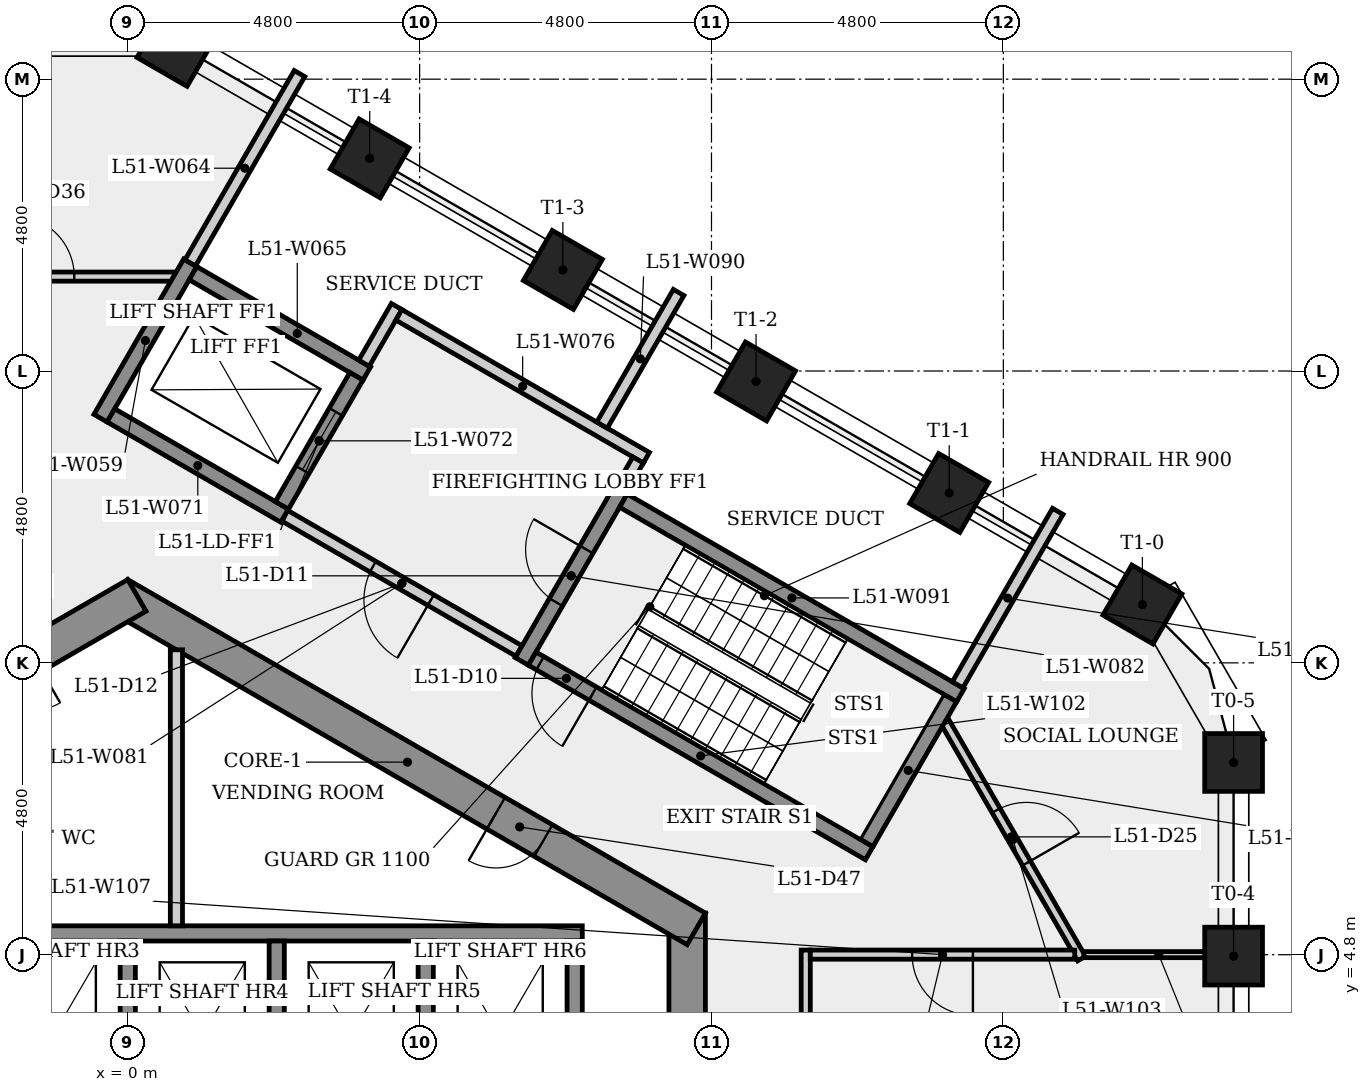
"""IFC4 building model, lengths in metres.
Left out: names, types, materials, properties, quantities, classifications, styles, units other than length and angle.
Written with IfcOpenShell. Run it as: python <this file> out.ifc"""

import sys

from ifc_helpers import new_model, si_unit, direction, frame, frame_2d, origin, origin_2d, place, context, subcontext, project, spatial, rectangle, extrude, element, fill, save


model = new_model("IFC4")
c1 = context("Model", 3, precision=1e-05, world=origin(), true_north=direction((0.0, 1.0)))
c2 = subcontext(c1, "Body", "Model", "MODEL_VIEW")
j1 = project(units=[si_unit("LENGTHUNIT", "METRE"), si_unit("PLANEANGLEUNIT", "RADIAN")], contexts=[c1])
p1 = place(None, origin())
s1 = spatial("IfcSite", under=j1, at=p1, CompositionType="ELEMENT")
p2 = place(p1, origin())
s2 = spatial("IfcBuilding", under=s1, at=p2, CompositionType="ELEMENT")
p3 = place(p2, frame((0.0, 0.0, 190.7)))
s3 = spatial("IfcBuildingStorey", under=s2, at=p3, CompositionType="ELEMENT", Elevation=190.7)
p4 = place(p3, frame((9.2, -5.485, 0.0), z_axis=(0.0, 0.0, 1.0), x_axis=(0.0, 1.0, 0.0)))
e1 = element("IfcWall", 1, at=p4, inside=s3, PredefinedType="SHEAR", context=c2, shape_type="SweptSolid", body=[
    extrude(rectangle(XDim=10.97, YDim=0.6, at=frame_2d((5.485, 0.0))), origin(), (0.0, 0.0, 1.0), 4.0),
])
p5 = place(p4, frame((4.685, 0.0, 0.0)))
e2 = element("IfcOpeningElement", 2, at=p5, cuts=e1, PredefinedType="OPENING", context=c2, shape_type="SweptSolid", body=[
    extrude(rectangle(XDim=1.6, YDim=2.1, at=frame_2d((0.8, 1.05))), frame((0.0, 0.31, 0.0), z_axis=(0.0, -1.0, 0.0), x_axis=(1.0, 0.0, 0.0)), (0.0, 0.0, 1.0), 0.62),
])
p6 = place(p3, frame((9.35, 5.225, 0.0), z_axis=(0.0, 0.0, 1.0), x_axis=(-0.866023993627, 0.500002442456, 0.0)))
e3 = element("IfcWall", 3, at=p6, inside=s3, PredefinedType="SHEAR", context=c2, shape_type="SweptSolid", body=[
    extrude(rectangle(XDim=10.97, YDim=0.6, at=frame_2d((5.485, 0.0))), origin(), (0.0, 0.0, 1.0), 4.0),
])
p7 = place(p6, frame((2.904, 0.0, 0.0)))
e4 = element("IfcOpeningElement", 4, at=p7, cuts=e3, PredefinedType="OPENING", context=c2, shape_type="SweptSolid", body=[
    extrude(rectangle(XDim=0.9, YDim=2.1, at=frame_2d((0.45, 1.05))), frame((0.0, 0.31, 0.0), z_axis=(0.0, -1.0, 0.0), x_axis=(1.0, 0.0, 0.0)), (0.0, 0.0, 1.0), 0.62),
])
p8 = place(p3, frame((0.15, 10.71, 0.0), z_axis=(0.0, 0.0, 1.0), x_axis=(-0.866023993627, -0.500002442456, 0.0)))
e5 = element("IfcWall", 5, at=p8, inside=s3, PredefinedType="SHEAR", context=c2, shape_type="SweptSolid", body=[
    extrude(rectangle(XDim=10.97, YDim=0.6, at=frame_2d((5.485, 0.0))), origin(), (0.0, 0.0, 1.0), 4.0),
])
p9 = place(p8, frame((9.182, 0.0, 0.0)))
e6 = element("IfcOpeningElement", 6, at=p9, cuts=e5, PredefinedType="OPENING", context=c2, shape_type="SweptSolid", body=[
    extrude(rectangle(XDim=0.9, YDim=2.1, at=frame_2d((0.45, 1.05))), frame((0.0, 0.31, 0.0), z_axis=(0.0, -1.0, 0.0), x_axis=(1.0, 0.0, 0.0)), (0.0, 0.0, 1.0), 0.62),
])
p10 = place(p8, frame((1.975, 0.0, 0.0)))
e7 = element("IfcOpeningElement", 7, at=p10, cuts=e5, PredefinedType="OPENING", context=c2, shape_type="SweptSolid", body=[
    extrude(rectangle(XDim=0.9, YDim=2.1, at=frame_2d((0.45, 1.05))), frame((0.0, 0.31, 0.0), z_axis=(0.0, -1.0, 0.0), x_axis=(1.0, 0.0, 0.0)), (0.0, 0.0, 1.0), 0.62),
])
for number, where, z_axis, x_axis in (
    (8, (18.187, 4.777, 0.0), (0.0, 0.0, 1.0), (1.0, 0.0, 0.0)),
    (9, (18.187, 7.962, 0.0), (0.0, 0.0, 1.0), (1.0, 0.0, 0.0)),
    (10, (16.687, 10.56, 0.0), (0.0, 0.0, 1.0), (0.5, 0.866, 0.0)),
    (11, (13.51, 12.394, 0.0), (0.0, 0.0, 1.0), (0.5, 0.866, 0.0)),
    (12, (10.333, 14.228, 0.0), (0.0, 0.0, 1.0), (0.5, 0.866, 0.0)),
    (13, (7.156, 16.062, 0.0), (0.0, 0.0, 1.0), (0.5, 0.866, 0.0)),
    (14, (3.979, 17.897, 0.0), (0.0, 0.0, 1.0), (0.5, 0.866, 0.0)),
    (15, (0.802, 19.731, 0.0), (0.0, 0.0, 1.0), (0.5, 0.866, 0.0)),
):
    element("IfcColumn", number, at=place(p3, frame(where, z_axis=z_axis, x_axis=x_axis)), inside=s3, PredefinedType="COLUMN", context=c2, shape_type="SweptSolid", body=[
        extrude(rectangle(XDim=0.95, YDim=0.95, at=origin_2d()), origin(), (0.0, 0.0, 1.0), 4.0),
    ])
p11 = place(p3, frame((-7.225, 5.15, 0.0), z_axis=(0.0, 0.0, 1.0), x_axis=(1.0, 0.0, 0.0)))
e16 = element("IfcWall", 16, at=p11, inside=s3, PredefinedType="SHEAR", context=c2, shape_type="SweptSolid", body=[
    extrude(rectangle(XDim=14.7, YDim=0.25, at=frame_2d((7.35, 0.0))), origin(), (0.0, 0.0, 1.0), 3.6),
])
p12 = place(p3, frame((-4.989, 18.524, 0.0), z_axis=(0.0, 0.0, 1.0), x_axis=(0.866025916125, 0.499999112599, 0.0)))
e17 = element("IfcWall", 17, at=p12, inside=s3, PredefinedType="PARTITIONING", context=c2, shape_type="SweptSolid", body=[
    extrude(rectangle(XDim=16.754, YDim=0.1, at=frame_2d((8.377, 0.0))), origin(), (0.0, 0.0, 1.0), 3.6),
])
p13 = place(p3, frame((-3.741, 15.953, 0.0), z_axis=(0.0, 0.0, 1.0), x_axis=(1.0, 0.0, 0.0)))
e18 = element("IfcWall", 18, at=p13, inside=s3, PredefinedType="PARTITIONING", context=c2, shape_type="SweptSolid", body=[
    extrude(rectangle(XDim=4.513, YDim=0.15, at=frame_2d((2.256, 0.0))), origin(), (0.0, 0.0, 1.0), 3.6),
])
p14 = place(p13, frame((1.861, 0.0, 0.0)))
e19 = element("IfcOpeningElement", 19, at=p14, cuts=e18, PredefinedType="OPENING", context=c2, shape_type="SweptSolid", body=[
    extrude(rectangle(XDim=1.0, YDim=2.1, at=frame_2d((0.5, 1.05))), frame((0.0, 0.085, 0.0), z_axis=(0.0, -1.0, 0.0), x_axis=(1.0, 0.0, 0.0)), (0.0, 0.0, 1.0), 0.17),
])
p15 = place(p3, frame((-0.448, 13.624, 0.0), z_axis=(0.0, 0.0, 1.0), x_axis=(0.500037662692, 0.866003658127, 0.0)))
e20 = element("IfcWall", 20, at=p15, inside=s3, PredefinedType="SHEAR", context=c2, shape_type="SweptSolid", body=[
    extrude(rectangle(XDim=2.95, YDim=0.25, at=frame_2d((1.475, 0.0))), origin(), (0.0, 0.0, 1.0), 3.6),
])
p16 = place(p3, frame((0.0, 5.025, 0.0), z_axis=(0.0, 0.0, 1.0), x_axis=(0.0, -1.0, 0.0)))
e21 = element("IfcWall", 21, at=p16, inside=s3, PredefinedType="SHEAR", context=c2, shape_type="SweptSolid", body=[
    extrude(rectangle(XDim=3.1, YDim=0.25, at=frame_2d((1.55, 0.0))), origin(), (0.0, 0.0, 1.0), 4.0),
])
p17 = place(p3, frame((0.8, 9.815, 0.0), z_axis=(0.0, 0.0, 1.0), x_axis=(0.0, -1.0, 0.0)))
e22 = element("IfcWall", 22, at=p17, inside=s3, PredefinedType="PARTITIONING", context=c2, shape_type="SweptSolid", body=[
    extrude(rectangle(XDim=4.54, YDim=0.2, at=frame_2d((2.27, 0.0))), origin(), (0.0, 0.0, 1.0), 3.6),
])
p18 = place(p3, frame((1.027, 16.179, 0.0), z_axis=(0.0, 0.0, 1.0), x_axis=(0.499988999718, 0.866031754707, 0.0)))
e23 = element("IfcWall", 23, at=p18, inside=s3, PredefinedType="PLUMBINGWALL", context=c2, shape_type="SweptSolid", body=[
    extrude(rectangle(XDim=3.594, YDim=0.2, at=frame_2d((1.797, 0.0))), origin(), (0.0, 0.0, 1.0), 3.6),
])
p19 = place(p3, frame((1.073, 16.008, 0.0), z_axis=(0.0, 0.0, 1.0), x_axis=(0.866040211805, -0.499974350878, 0.0)))
e24 = element("IfcWall", 24, at=p19, inside=s3, PredefinedType="SHEAR", context=c2, shape_type="SweptSolid", body=[
    extrude(rectangle(XDim=3.3, YDim=0.25, at=frame_2d((1.65, 0.0))), origin(), (0.0, 0.0, 1.0), 3.6),
])
p20 = place(p3, frame((2.45, 5.025, 0.0), z_axis=(0.0, 0.0, 1.0), x_axis=(0.0, -1.0, 0.0)))
e25 = element("IfcWall", 25, at=p20, inside=s3, PredefinedType="SHEAR", context=c2, shape_type="SweptSolid", body=[
    extrude(rectangle(XDim=3.1, YDim=0.25, at=frame_2d((1.55, 0.0))), origin(), (0.0, 0.0, 1.0), 4.0),
])
p21 = place(p3, frame((2.581, 12.02, 0.0), z_axis=(0.0, 0.0, 1.0), x_axis=(-0.866040211805, 0.499974350878, 0.0)))
e26 = element("IfcWall", 26, at=p21, inside=s3, PredefinedType="SHEAR", context=c2, shape_type="SweptSolid", body=[
    extrude(rectangle(XDim=3.3, YDim=0.25, at=frame_2d((1.65, 0.0))), origin(), (0.0, 0.0, 1.0), 3.6),
])
p22 = place(p3, frame((2.535, 12.191, 0.0), z_axis=(0.0, 0.0, 1.0), x_axis=(0.500061746146, 0.865989751695, 0.0)))
e27 = element("IfcWall", 27, at=p22, inside=s3, PredefinedType="SHEAR", context=c2, shape_type="SweptSolid", body=[
    extrude(rectangle(XDim=2.45, YDim=0.25, at=frame_2d((1.225, 0.0))), origin(), (0.0, 0.0, 1.0), 4.0),
])
p23 = place(p22, frame((0.675, 0.0, 0.0)))
e28 = element("IfcOpeningElement", 28, at=p23, cuts=e27, PredefinedType="OPENING", context=c2, shape_type="SweptSolid", body=[
    extrude(rectangle(XDim=1.1, YDim=2.1, at=frame_2d((0.55, 1.05))), frame((0.0, 0.135, 0.0), z_axis=(0.0, -1.0, 0.0), x_axis=(1.0, 0.0, 0.0)), (0.0, 0.0, 1.0), 0.27),
])
p24 = place(p3, frame((3.885, 14.529, 0.0), z_axis=(0.0, 0.0, 1.0), x_axis=(0.499997628298, 0.866026773083, 0.0)))
e29 = element("IfcWall", 29, at=p24, inside=s3, PredefinedType="PLUMBINGWALL", context=c2, shape_type="SweptSolid", body=[
    extrude(rectangle(XDim=1.075, YDim=0.2, at=frame_2d((0.538, 0.0))), origin(), (0.0, 0.0, 1.0), 3.6),
])
p25 = place(p3, frame((4.459, 15.323, 0.0), z_axis=(0.0, 0.0, 1.0), x_axis=(0.866016039709, -0.500016218704, 0.0)))
e30 = element("IfcWall", 30, at=p25, inside=s3, PredefinedType="PLUMBINGWALL", context=c2, shape_type="SweptSolid", body=[
    extrude(rectangle(XDim=4.7, YDim=0.2, at=frame_2d((2.35, 0.0))), origin(), (0.0, 0.0, 1.0), 3.6),
])
p26 = place(p3, frame((4.9, 5.025, 0.0), z_axis=(0.0, 0.0, 1.0), x_axis=(0.0, -1.0, 0.0)))
e31 = element("IfcWall", 31, at=p26, inside=s3, PredefinedType="SHEAR", context=c2, shape_type="SweptSolid", body=[
    extrude(rectangle(XDim=3.1, YDim=0.25, at=frame_2d((1.55, 0.0))), origin(), (0.0, 0.0, 1.0), 4.0),
])
p27 = place(p3, frame((6.435, 9.795, 0.0), z_axis=(0.0, 0.0, 1.0), x_axis=(-0.866012907634, 0.500021643343, 0.0)))
e32 = element("IfcWall", 32, at=p27, inside=s3, PredefinedType="PARTITIONING", context=c2, shape_type="SweptSolid", body=[
    extrude(rectangle(XDim=4.45, YDim=0.2, at=frame_2d((2.225, 0.0))), origin(), (0.0, 0.0, 1.0), 3.6),
])
p28 = place(p27, frame((1.675, 0.0, 0.0)))
e33 = element("IfcOpeningElement", 33, at=p28, cuts=e32, PredefinedType="OPENING", context=c2, shape_type="SweptSolid", body=[
    extrude(rectangle(XDim=1.1, YDim=2.1, at=frame_2d((0.55, 1.05))), frame((0.0, 0.11, 0.0), z_axis=(0.0, -1.0, 0.0), x_axis=(1.0, 0.0, 0.0)), (0.0, 0.0, 1.0), 0.22),
])
p29 = place(p3, frame((6.48, 9.624, 0.0), z_axis=(0.0, 0.0, 1.0), x_axis=(0.500017246033, 0.866015446554, 0.0)))
e34 = element("IfcWall", 34, at=p29, inside=s3, PredefinedType="SHEAR", context=c2, shape_type="SweptSolid", body=[
    extrude(rectangle(XDim=3.25, YDim=0.25, at=frame_2d((1.625, 0.0))), origin(), (0.0, 0.0, 1.0), 3.6),
])
p30 = place(p29, frame((1.125, 0.0, 0.0)))
e35 = element("IfcOpeningElement", 35, at=p30, cuts=e34, PredefinedType="OPENING", context=c2, shape_type="SweptSolid", body=[
    extrude(rectangle(XDim=1.0, YDim=2.1, at=frame_2d((0.5, 1.05))), frame((0.0, 0.135, 0.0), z_axis=(0.0, -1.0, 0.0), x_axis=(1.0, 0.0, 0.0)), (0.0, 0.0, 1.0), 0.27),
])
p31 = place(p3, frame((7.35, 5.025, 0.0), z_axis=(0.0, 0.0, 1.0), x_axis=(0.0, -1.0, 0.0)))
e36 = element("IfcWall", 36, at=p31, inside=s3, PredefinedType="SHEAR", context=c2, shape_type="SweptSolid", body=[
    extrude(rectangle(XDim=3.1, YDim=0.25, at=frame_2d((1.55, 0.0))), origin(), (0.0, 0.0, 1.0), 4.0),
])
p32 = place(p3, frame((7.8, 13.51, 0.0), z_axis=(0.0, 0.0, 1.0), x_axis=(0.499985316883, 0.86603388092, 0.0)))
e37 = element("IfcWall", 37, at=p32, inside=s3, PredefinedType="PLUMBINGWALL", context=c2, shape_type="SweptSolid", body=[
    extrude(rectangle(XDim=2.519, YDim=0.2, at=frame_2d((1.26, 0.0))), origin(), (0.0, 0.0, 1.0), 3.6),
])
p33 = place(p3, frame((8.151, 12.268, 0.0), z_axis=(0.0, 0.0, 1.0), x_axis=(0.866025499775, -0.499999833739, 0.0)))
e38 = element("IfcWall", 38, at=p33, inside=s3, PredefinedType="SHEAR", context=c2, shape_type="SweptSolid", body=[
    extrude(rectangle(XDim=6.4, YDim=0.25, at=frame_2d((3.2, 0.0))), origin(), (0.0, 0.0, 1.0), 3.6),
])
p34 = place(p3, frame((8.393, 12.937, 0.0), z_axis=(0.0, 0.0, 1.0), x_axis=(-0.500065409566, -0.86598763626, 0.0)))
e39 = element("IfcWall", 39, at=p34, inside=s3, PredefinedType="PLUMBINGWALL", context=c2, shape_type="SweptSolid", body=[
    extrude(rectangle(XDim=0.575, YDim=0.2, at=frame_2d((0.288, 0.0))), origin(), (0.0, 0.0, 1.0), 3.6),
])
p35 = place(p3, frame((11.15, -4.726, 0.0), z_axis=(0.0, 0.0, 1.0), x_axis=(0.0, 1.0, 0.0)))
e40 = element("IfcWall", 40, at=p35, inside=s3, PredefinedType="PARTITIONING", context=c2, shape_type="SweptSolid", body=[
    extrude(rectangle(XDim=9.603, YDim=0.15, at=frame_2d((4.801, 0.0))), origin(), (0.0, 0.0, 1.0), 3.6),
])
p36 = place(p35, frame((4.226, 0.0, 0.0)))
e41 = element("IfcOpeningElement", 41, at=p36, cuts=e40, PredefinedType="OPENING", context=c2, shape_type="SweptSolid", body=[
    extrude(rectangle(XDim=1.0, YDim=2.1, at=frame_2d((0.5, 1.05))), frame((0.0, 0.085, 0.0), z_axis=(0.0, -1.0, 0.0), x_axis=(1.0, 0.0, 0.0)), (0.0, 0.0, 1.0), 0.17),
])
p37 = place(p3, frame((12.194, 6.47, 0.0), z_axis=(0.0, 0.0, 1.0), x_axis=(-0.866025499775, 0.499999833739, 0.0)))
e42 = element("IfcWall", 42, at=p37, inside=s3, PredefinedType="SHEAR", context=c2, shape_type="SweptSolid", body=[
    extrude(rectangle(XDim=6.4, YDim=0.25, at=frame_2d((3.2, 0.0))), origin(), (0.0, 0.0, 1.0), 3.6),
])
p38 = place(p37, frame((5.25, 0.0, 0.0)))
e43 = element("IfcOpeningElement", 43, at=p38, cuts=e42, PredefinedType="OPENING", context=c2, shape_type="SweptSolid", body=[
    extrude(rectangle(XDim=1.0, YDim=2.1, at=frame_2d((0.5, 1.05))), frame((0.0, 0.135, 0.0), z_axis=(0.0, -1.0, 0.0), x_axis=(1.0, 0.0, 0.0)), (0.0, 0.0, 1.0), 0.27),
])
p39 = place(p3, frame((13.43, 8.645, 0.0), z_axis=(0.0, 0.0, 1.0), x_axis=(0.499967522609, -0.866044153803, 0.0)))
e44 = element("IfcWall", 44, at=p39, inside=s3, PredefinedType="PARTITIONING", context=c2, shape_type="SweptSolid", body=[
    extrude(rectangle(XDim=4.513, YDim=0.15, at=frame_2d((2.256, 0.0))), origin(), (0.0, 0.0, 1.0), 3.6),
])
p40 = place(p39, frame((1.702, 0.0, 0.0)))
e45 = element("IfcOpeningElement", 45, at=p40, cuts=e44, PredefinedType="OPENING", context=c2, shape_type="SweptSolid", body=[
    extrude(rectangle(XDim=1.0, YDim=2.1, at=frame_2d((0.5, 1.05))), frame((0.0, 0.085, 0.0), z_axis=(0.0, -1.0, 0.0), x_axis=(1.0, 0.0, 0.0)), (0.0, 0.0, 1.0), 0.17),
])
p41 = place(p3, frame((12.148, 6.641, 0.0), z_axis=(0.0, 0.0, 1.0), x_axis=(0.500034990121, 0.866005201286, 0.0)))
e46 = element("IfcWall", 46, at=p41, inside=s3, PredefinedType="SHEAR", context=c2, shape_type="SweptSolid", body=[
    extrude(rectangle(XDim=2.75, YDim=0.25, at=frame_2d((1.375, 0.0))), origin(), (0.0, 0.0, 1.0), 3.6),
])
p42 = place(p3, frame((15.295, 12.092, 0.0), z_axis=(0.0, 0.0, 1.0), x_axis=(-0.499949127178, -0.86605477323, 0.0)))
e47 = element("IfcWall", 47, at=p42, inside=s3, PredefinedType="PLUMBINGWALL", context=c2, shape_type="SweptSolid", body=[
    extrude(rectangle(XDim=3.294, YDim=0.2, at=frame_2d((1.647, 0.0))), origin(), (0.0, 0.0, 1.0), 3.6),
])
p43 = place(p3, frame((15.574, 4.801, 0.0), z_axis=(0.0, 0.0, 1.0), x_axis=(-1.0, 0.0, 0.0)))
e48 = element("IfcWall", 48, at=p43, inside=s3, PredefinedType="PARTITIONING", context=c2, shape_type="SweptSolid", body=[
    extrude(rectangle(XDim=4.349, YDim=0.15, at=frame_2d((2.174, 0.0))), origin(), (0.0, 0.0, 1.0), 3.6),
])
p44 = place(p43, frame((1.674, 0.0, 0.0)))
e49 = element("IfcOpeningElement", 49, at=p44, cuts=e48, PredefinedType="OPENING", context=c2, shape_type="SweptSolid", body=[
    extrude(rectangle(XDim=1.0, YDim=2.1, at=frame_2d((0.5, 1.05))), frame((0.0, 0.085, 0.0), z_axis=(0.0, -1.0, 0.0), x_axis=(1.0, 0.0, 0.0)), (0.0, 0.0, 1.0), 0.17),
])
p45 = place(p3, frame((15.724, 4.801, 0.0), z_axis=(0.0, 0.0, 1.0), x_axis=(1.0, 0.0, 0.0)))
e50 = element("IfcWall", 50, at=p45, inside=s3, PredefinedType="PARTITIONING", context=c2, shape_type="SweptSolid", body=[
    extrude(rectangle(XDim=2.463, YDim=0.1, at=frame_2d((1.231, 0.0))), origin(), (0.0, 0.0, 1.0), 3.6),
])
p46 = place(p38, origin())
e51 = element("IfcDoor", 51, at=p46, inside=s3, OperationType="SINGLE_SWING_LEFT", PredefinedType="DOOR", context=c2, shape_type="SweptSolid", body=[
    extrude(rectangle(XDim=1.0, YDim=2.1, at=frame_2d((0.5, 1.05))), frame((0.0, 0.025, 0.0), z_axis=(0.0, -1.0, 0.0), x_axis=(1.0, 0.0, 0.0)), (0.0, 0.0, 1.0), 0.05),
])
fill(e43, e51)
p47 = place(p30, origin())
e52 = element("IfcDoor", 52, at=p47, inside=s3, OperationType="SINGLE_SWING_RIGHT", PredefinedType="DOOR", context=c2, shape_type="SweptSolid", body=[
    extrude(rectangle(XDim=1.0, YDim=2.1, at=frame_2d((0.5, 1.05))), frame((0.0, 0.025, 0.0), z_axis=(0.0, -1.0, 0.0), x_axis=(1.0, 0.0, 0.0)), (0.0, 0.0, 1.0), 0.05),
])
fill(e35, e52)
p48 = place(p28, origin())
e53 = element("IfcDoor", 53, at=p48, inside=s3, OperationType="SINGLE_SWING_LEFT", PredefinedType="DOOR", context=c2, shape_type="SweptSolid", body=[
    extrude(rectangle(XDim=1.1, YDim=2.1, at=frame_2d((0.55, 1.05))), frame((0.0, 0.025, 0.0), z_axis=(0.0, -1.0, 0.0), x_axis=(1.0, 0.0, 0.0)), (0.0, 0.0, 1.0), 0.05),
])
fill(e33, e53)
p49 = place(p23, origin())
e54 = element("IfcDoor", 54, at=p49, inside=s3, OperationType="SLIDING_TO_LEFT", PredefinedType="DOOR", context=c2, shape_type="SweptSolid", body=[
    extrude(rectangle(XDim=1.1, YDim=2.1, at=frame_2d((0.55, 1.05))), frame((0.0, 0.025, 0.0), z_axis=(0.0, -1.0, 0.0), x_axis=(1.0, 0.0, 0.0)), (0.0, 0.0, 1.0), 0.05),
])
fill(e28, e54)
p50 = place(p44, origin())
e55 = element("IfcDoor", 55, at=p50, inside=s3, OperationType="SINGLE_SWING_LEFT", PredefinedType="DOOR", context=c2, shape_type="SweptSolid", body=[
    extrude(rectangle(XDim=1.0, YDim=2.1, at=frame_2d((0.5, 1.05))), frame((0.0, 0.025, 0.0), z_axis=(0.0, -1.0, 0.0), x_axis=(1.0, 0.0, 0.0)), (0.0, 0.0, 1.0), 0.05),
])
fill(e49, e55)
p51 = place(p40, origin())
e56 = element("IfcDoor", 56, at=p51, inside=s3, OperationType="SINGLE_SWING_RIGHT", PredefinedType="DOOR", context=c2, shape_type="SweptSolid", body=[
    extrude(rectangle(XDim=1.0, YDim=2.1, at=frame_2d((0.5, 1.05))), frame((0.0, 0.025, 0.0), z_axis=(0.0, -1.0, 0.0), x_axis=(1.0, 0.0, 0.0)), (0.0, 0.0, 1.0), 0.05),
])
fill(e45, e56)
p52 = place(p14, origin())
e57 = element("IfcDoor", 57, at=p52, inside=s3, OperationType="SINGLE_SWING_LEFT", PredefinedType="DOOR", context=c2, shape_type="SweptSolid", body=[
    extrude(rectangle(XDim=1.0, YDim=2.1, at=frame_2d((0.5, 1.05))), frame((0.0, 0.025, 0.0), z_axis=(0.0, -1.0, 0.0), x_axis=(1.0, 0.0, 0.0)), (0.0, 0.0, 1.0), 0.05),
])
fill(e19, e57)
p53 = place(p7, origin())
e58 = element("IfcDoor", 58, at=p53, inside=s3, OperationType="SINGLE_SWING_RIGHT", PredefinedType="DOOR", context=c2, shape_type="SweptSolid", body=[
    extrude(rectangle(XDim=0.9, YDim=2.1, at=frame_2d((0.45, 1.05))), frame((0.0, 0.025, 0.0), z_axis=(0.0, -1.0, 0.0), x_axis=(1.0, 0.0, 0.0)), (0.0, 0.0, 1.0), 0.05),
])
fill(e4, e58)
save(model, sys.argv[1])
